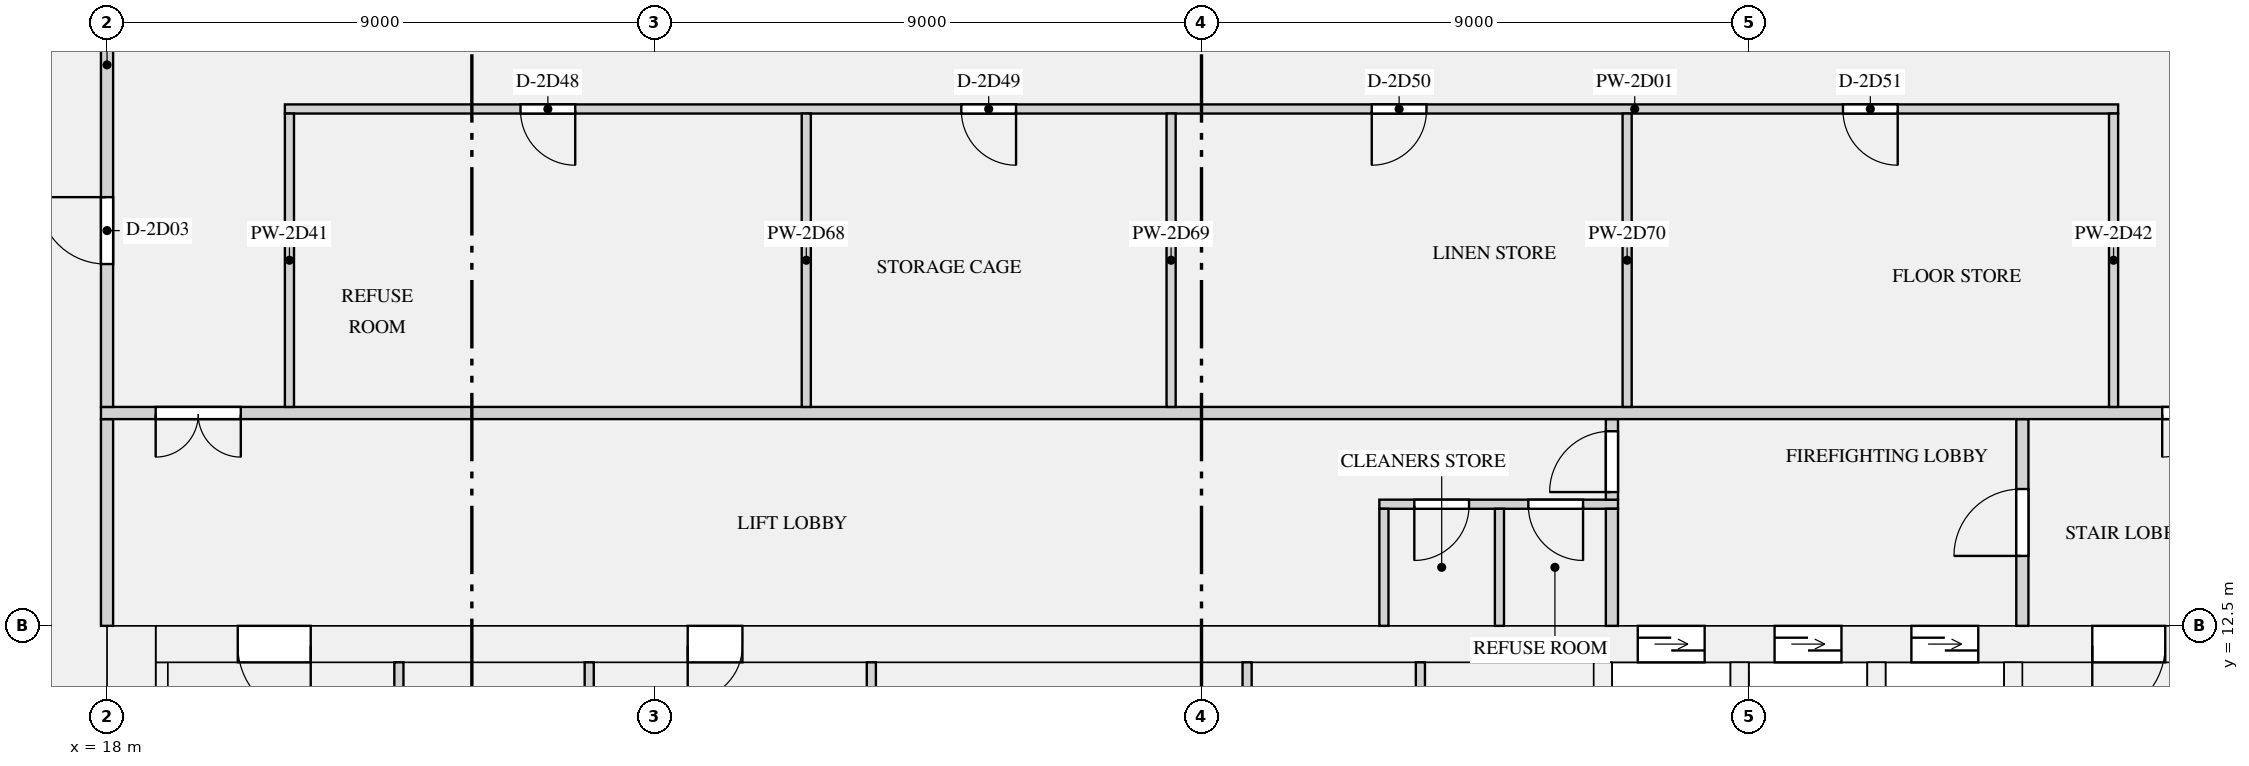
"""IFC4 building model, lengths in metres.
Left out: names, types, materials, properties, quantities, classifications, styles, units other than length and angle.
Written with IfcOpenShell. Run it as: python <this file> out.ifc"""

import sys

from ifc_helpers import new_model, si_unit, direction, frame, frame_2d, origin, place, context, subcontext, project, spatial, rectangle, extrude, element, fill, save


model = new_model("IFC4")
c1 = context("Model", 3, precision=1e-05, world=origin(), true_north=direction((0.0, 1.0)))
c2 = subcontext(c1, "Body", "Model", "MODEL_VIEW")
j1 = project(units=[si_unit("LENGTHUNIT", "METRE"), si_unit("PLANEANGLEUNIT", "RADIAN")], contexts=[c1])
p1 = place(None, origin())
s1 = spatial("IfcSite", under=j1, at=p1, CompositionType="ELEMENT")
p2 = place(p1, origin())
s2 = spatial("IfcBuilding", under=s1, at=p2, CompositionType="ELEMENT")
p3 = place(p2, frame((0.0, 0.0, 111.9)))
s3 = spatial("IfcBuildingStorey", under=s2, at=p3, CompositionType="ELEMENT", Elevation=111.9)
p4 = place(p3, frame((18.4, 0.0, 0.0), z_axis=(0.0, 0.0, 1.0), x_axis=(0.0, 1.0, 0.0)))
e1 = element("IfcWall", 1, at=p4, inside=s3, PredefinedType="SHEAR", context=c2, shape_type="SweptSolid", body=[
    extrude(rectangle(XDim=12.5, YDim=0.8, at=frame_2d((6.25, 0.0))), origin(), (0.0, 0.0, 1.0), 3.15),
])
p5 = place(p3, frame((18.8, 12.2, 0.0), z_axis=(0.0, 0.0, 1.0), x_axis=(1.0, 0.0, 0.0)))
e2 = element("IfcWall", 2, at=p5, inside=s3, PredefinedType="SHEAR", context=c2, shape_type="SweptSolid", body=[
    extrude(rectangle(XDim=34.4, YDim=0.6, at=frame_2d((17.2, 0.0))), origin(), (0.0, 0.0, 1.0), 3.15),
])
p6 = place(p5, frame((24.375, 0.0, 0.0)))
e3 = element("IfcOpeningElement", 3, at=p6, cuts=e2, PredefinedType="OPENING", context=c2, shape_type="SweptSolid", body=[
    extrude(rectangle(XDim=1.1, YDim=2.1, at=frame_2d((0.55, 1.05))), frame((0.0, 0.31, 0.0), z_axis=(0.0, -1.0, 0.0), x_axis=(1.0, 0.0, 0.0)), (0.0, 0.0, 1.0), 0.62),
])
p7 = place(p5, frame((26.625, 0.0, 0.0)))
e4 = element("IfcOpeningElement", 4, at=p7, cuts=e2, PredefinedType="OPENING", context=c2, shape_type="SweptSolid", body=[
    extrude(rectangle(XDim=1.1, YDim=2.1, at=frame_2d((0.55, 1.05))), frame((0.0, 0.31, 0.0), z_axis=(0.0, -1.0, 0.0), x_axis=(1.0, 0.0, 0.0)), (0.0, 0.0, 1.0), 0.62),
])
p8 = place(p5, frame((28.875, 0.0, 0.0)))
e5 = element("IfcOpeningElement", 5, at=p8, cuts=e2, PredefinedType="OPENING", context=c2, shape_type="SweptSolid", body=[
    extrude(rectangle(XDim=1.1, YDim=2.1, at=frame_2d((0.55, 1.05))), frame((0.0, 0.31, 0.0), z_axis=(0.0, -1.0, 0.0), x_axis=(1.0, 0.0, 0.0)), (0.0, 0.0, 1.0), 0.62),
])
p9 = place(p5, frame((8.75, 0.0, 0.0)))
e6 = element("IfcOpeningElement", 6, at=p9, cuts=e2, PredefinedType="OPENING", context=c2, shape_type="SweptSolid", body=[
    extrude(rectangle(XDim=0.9, YDim=2.1, at=frame_2d((0.45, 1.05))), frame((0.0, 0.31, 0.0), z_axis=(0.0, -1.0, 0.0), x_axis=(1.0, 0.0, 0.0)), (0.0, 0.0, 1.0), 0.62),
])
p10 = place(p5, frame((1.35, 0.0, 0.0)))
e7 = element("IfcOpeningElement", 7, at=p10, cuts=e2, PredefinedType="OPENING", context=c2, shape_type="SweptSolid", body=[
    extrude(rectangle(XDim=1.2, YDim=2.1, at=frame_2d((0.6, 1.05))), frame((0.0, 0.31, 0.0), z_axis=(0.0, -1.0, 0.0), x_axis=(1.0, 0.0, 0.0)), (0.0, 0.0, 1.0), 0.62),
])
p11 = place(p5, frame((31.85, 0.0, 0.0)))
e8 = element("IfcOpeningElement", 8, at=p11, cuts=e2, PredefinedType="OPENING", context=c2, shape_type="SweptSolid", body=[
    extrude(rectangle(XDim=1.2, YDim=2.1, at=frame_2d((0.6, 1.05))), frame((0.0, 0.31, 0.0), z_axis=(0.0, -1.0, 0.0), x_axis=(1.0, 0.0, 0.0)), (0.0, 0.0, 1.0), 0.62),
])
p12 = place(p3, frame((18.9, 1.0, 0.0), z_axis=(0.0, 0.0, 1.0), x_axis=(0.0, 1.0, 0.0)))
e9 = element("IfcWall", 9, at=p12, inside=s3, PredefinedType="SHEAR", context=c2, shape_type="SweptSolid", body=[
    extrude(rectangle(XDim=10.9, YDim=0.2, at=frame_2d((5.45, 0.0))), origin(), (0.0, 0.0, 1.0), 3.15),
])
for number, where, z_axis, x_axis in (
    (10, (42.6, 8.25, 0.0), (0.0, 0.0, 1.0), (0.0, 1.0, 0.0)),
    (11, (44.85, 8.25, 0.0), (0.0, 0.0, 1.0), (0.0, 1.0, 0.0)),
    (12, (47.1, 8.25, 0.0), (0.0, 0.0, 1.0), (0.0, 1.0, 0.0)),
    (13, (49.35, 8.25, 0.0), (0.0, 0.0, 1.0), (0.0, 1.0, 0.0)),
):
    element("IfcWall", number, at=place(p3, frame(where, z_axis=z_axis, x_axis=x_axis)), inside=s3, PredefinedType="SHEAR", context=c2, shape_type="SweptSolid", body=[
        extrude(rectangle(XDim=3.65, YDim=0.3, at=frame_2d((1.825, 0.0))), origin(), (0.0, 0.0, 1.0), 3.15),
    ])
p13 = place(p3, frame((38.925, 14.5, 0.0), z_axis=(0.0, 0.0, 1.0), x_axis=(1.0, 0.0, 0.0)))
e14 = element("IfcWall", 14, at=p13, inside=s3, PredefinedType="PARTITIONING", context=c2, shape_type="SweptSolid", body=[
    extrude(rectangle(XDim=3.925, YDim=0.15, at=frame_2d((1.962, 0.0))), origin(), (0.0, 0.0, 1.0), 2.83),
])
p14 = place(p13, frame((0.575, 0.0, 0.0)))
e15 = element("IfcOpeningElement", 15, at=p14, cuts=e14, PredefinedType="OPENING", context=c2, shape_type="SweptSolid", body=[
    extrude(rectangle(XDim=0.9, YDim=2.1, at=frame_2d((0.45, 1.05))), frame((0.0, 0.085, 0.0), z_axis=(0.0, -1.0, 0.0), x_axis=(1.0, 0.0, 0.0)), (0.0, 0.0, 1.0), 0.17),
])
p15 = place(p13, frame((2.45, 0.0, 0.0)))
e16 = element("IfcOpeningElement", 16, at=p15, cuts=e14, PredefinedType="OPENING", context=c2, shape_type="SweptSolid", body=[
    extrude(rectangle(XDim=0.9, YDim=2.1, at=frame_2d((0.45, 1.05))), frame((0.0, 0.085, 0.0), z_axis=(0.0, -1.0, 0.0), x_axis=(1.0, 0.0, 0.0)), (0.0, 0.0, 1.0), 0.17),
])
for number, where, z_axis, x_axis in (
    (17, (22.8, 6.725, 0.0), (0.0, 0.0, 1.0), (0.0, 1.0, 0.0)),
    (18, (36.75, 6.725, 0.0), (0.0, 0.0, 1.0), (0.0, 1.0, 0.0)),
    (19, (39.6, 6.725, 0.0), (0.0, 0.0, 1.0), (0.0, 1.0, 0.0)),
):
    element("IfcWall", number, at=place(p3, frame(where, z_axis=z_axis, x_axis=x_axis)), inside=s3, PredefinedType="PARTITIONING", context=c2, shape_type="SweptSolid", body=[
        extrude(rectangle(XDim=5.175, YDim=0.15, at=frame_2d((2.587, 0.0))), origin(), (0.0, 0.0, 1.0), 2.83),
    ])
for number, where, z_axis, x_axis in (
    (20, (25.93, 9.805, 0.0), (0.0, 0.0, 1.0), (0.0, 1.0, 0.0)),
    (21, (30.57, 9.805, 0.0), (0.0, 0.0, 1.0), (0.0, 1.0, 0.0)),
):
    element("IfcWall", number, at=place(p3, frame(where, z_axis=z_axis, x_axis=x_axis)), inside=s3, PredefinedType="PARTITIONING", context=c2, shape_type="SweptSolid", body=[
        extrude(rectangle(XDim=2.095, YDim=0.15, at=frame_2d((1.047, 0.0))), origin(), (0.0, 0.0, 1.0), 2.83),
    ])
p16 = place(p3, frame((18.0, 12.5, 0.0), z_axis=(0.0, 0.0, 1.0), x_axis=(0.0, 1.0, 0.0)))
e22 = element("IfcWall", 22, at=p16, inside=s3, PredefinedType="PARTITIONING", context=c2, shape_type="SweptSolid", body=[
    extrude(rectangle(XDim=3.4, YDim=0.2, at=frame_2d((1.7, 0.0))), origin(), (0.0, 0.0, 1.0), 2.83),
])
for number, where, z_axis, x_axis in (
    (23, (39.0, 12.5, 0.0), (0.0, 0.0, 1.0), (0.0, 1.0, 0.0)),
    (24, (40.9, 12.5, 0.0), (0.0, 0.0, 1.0), (0.0, 1.0, 0.0)),
):
    element("IfcWall", number, at=place(p3, frame(where, z_axis=z_axis, x_axis=x_axis)), inside=s3, PredefinedType="PARTITIONING", context=c2, shape_type="SweptSolid", body=[
        extrude(rectangle(XDim=1.925, YDim=0.15, at=frame_2d((0.962, 0.0))), origin(), (0.0, 0.0, 1.0), 2.83),
    ])
p17 = place(p3, frame((42.75, 12.5, 0.0), z_axis=(0.0, 0.0, 1.0), x_axis=(0.0, 1.0, 0.0)))
e25 = element("IfcWall", 25, at=p17, inside=s3, PredefinedType="PARTITIONING", context=c2, shape_type="SweptSolid", body=[
    extrude(rectangle(XDim=1.925, YDim=0.2, at=frame_2d((0.962, 0.0))), origin(), (0.0, 0.0, 1.0), 2.83),
])
p18 = place(p3, frame((49.5, 12.5, 0.0), z_axis=(0.0, 0.0, 1.0), x_axis=(0.0, 1.0, 0.0)))
e26 = element("IfcWall", 26, at=p18, inside=s3, PredefinedType="PARTITIONING", context=c2, shape_type="SweptSolid", body=[
    extrude(rectangle(XDim=3.4, YDim=0.2, at=frame_2d((1.7, 0.0))), origin(), (0.0, 0.0, 1.0), 2.83),
])
p19 = place(p18, frame((1.15, 0.0, 0.0)))
e27 = element("IfcOpeningElement", 27, at=p19, cuts=e26, PredefinedType="OPENING", context=c2, shape_type="SweptSolid", body=[
    extrude(rectangle(XDim=1.1, YDim=2.1, at=frame_2d((0.55, 1.05))), frame((0.0, 0.11, 0.0), z_axis=(0.0, -1.0, 0.0), x_axis=(1.0, 0.0, 0.0)), (0.0, 0.0, 1.0), 0.22),
])
p20 = place(p3, frame((42.75, 14.575, 0.0), z_axis=(0.0, 0.0, 1.0), x_axis=(0.0, 1.0, 0.0)))
e28 = element("IfcWall", 28, at=p20, inside=s3, PredefinedType="PARTITIONING", context=c2, shape_type="SweptSolid", body=[
    extrude(rectangle(XDim=1.325, YDim=0.2, at=frame_2d((0.663, 0.0))), origin(), (0.0, 0.0, 1.0), 2.83),
])
p21 = place(p20, frame((0.125, 0.0, 0.0)))
e29 = element("IfcOpeningElement", 29, at=p21, cuts=e28, PredefinedType="OPENING", context=c2, shape_type="SweptSolid", body=[
    extrude(rectangle(XDim=1.0, YDim=2.1, at=frame_2d((0.5, 1.05))), frame((0.0, 0.11, 0.0), z_axis=(0.0, -1.0, 0.0), x_axis=(1.0, 0.0, 0.0)), (0.0, 0.0, 1.0), 0.22),
])
p22 = place(p3, frame((20.925, 21.0, 0.0), z_axis=(0.0, 0.0, 1.0), x_axis=(1.0, 0.0, 0.0)))
e30 = element("IfcWall", 30, at=p22, inside=s3, PredefinedType="PARTITIONING", context=c2, shape_type="SweptSolid", body=[
    extrude(rectangle(XDim=30.15, YDim=0.15, at=frame_2d((15.075, 0.0))), origin(), (0.0, 0.0, 1.0), 2.83),
])
p23 = place(p22, frame((3.875, 0.0, 0.0)))
e31 = element("IfcOpeningElement", 31, at=p23, cuts=e30, PredefinedType="OPENING", context=c2, shape_type="SweptSolid", body=[
    extrude(rectangle(XDim=0.9, YDim=2.1, at=frame_2d((0.45, 1.05))), frame((0.0, 0.085, 0.0), z_axis=(0.0, -1.0, 0.0), x_axis=(1.0, 0.0, 0.0)), (0.0, 0.0, 1.0), 0.17),
])
p24 = place(p22, frame((11.125, 0.0, 0.0)))
e32 = element("IfcOpeningElement", 32, at=p24, cuts=e30, PredefinedType="OPENING", context=c2, shape_type="SweptSolid", body=[
    extrude(rectangle(XDim=0.9, YDim=2.1, at=frame_2d((0.45, 1.05))), frame((0.0, 0.085, 0.0), z_axis=(0.0, -1.0, 0.0), x_axis=(1.0, 0.0, 0.0)), (0.0, 0.0, 1.0), 0.17),
])
p25 = place(p22, frame((17.875, 0.0, 0.0)))
e33 = element("IfcOpeningElement", 33, at=p25, cuts=e30, PredefinedType="OPENING", context=c2, shape_type="SweptSolid", body=[
    extrude(rectangle(XDim=0.9, YDim=2.1, at=frame_2d((0.45, 1.05))), frame((0.0, 0.085, 0.0), z_axis=(0.0, -1.0, 0.0), x_axis=(1.0, 0.0, 0.0)), (0.0, 0.0, 1.0), 0.17),
])
p26 = place(p22, frame((25.625, 0.0, 0.0)))
e34 = element("IfcOpeningElement", 34, at=p26, cuts=e30, PredefinedType="OPENING", context=c2, shape_type="SweptSolid", body=[
    extrude(rectangle(XDim=0.9, YDim=2.1, at=frame_2d((0.45, 1.05))), frame((0.0, 0.085, 0.0), z_axis=(0.0, -1.0, 0.0), x_axis=(1.0, 0.0, 0.0)), (0.0, 0.0, 1.0), 0.17),
])
p27 = place(p3, frame((17.9, 16.0, 0.0), z_axis=(0.0, 0.0, 1.0), x_axis=(1.0, 0.0, 0.0)))
e35 = element("IfcWall", 35, at=p27, inside=s3, PredefinedType="PARTITIONING", context=c2, shape_type="SweptSolid", body=[
    extrude(rectangle(XDim=36.2, YDim=0.2, at=frame_2d((18.1, 0.0))), origin(), (0.0, 0.0, 1.0), 2.83),
])
p28 = place(p27, frame((0.9, 0.0, 0.0)))
e36 = element("IfcOpeningElement", 36, at=p28, cuts=e35, PredefinedType="OPENING", context=c2, shape_type="SweptSolid", body=[
    extrude(rectangle(XDim=1.4, YDim=2.1, at=frame_2d((0.7, 1.05))), frame((0.0, 0.11, 0.0), z_axis=(0.0, -1.0, 0.0), x_axis=(1.0, 0.0, 0.0)), (0.0, 0.0, 1.0), 0.22),
])
p29 = place(p27, frame((33.9, 0.0, 0.0)))
e37 = element("IfcOpeningElement", 37, at=p29, cuts=e35, PredefinedType="OPENING", context=c2, shape_type="SweptSolid", body=[
    extrude(rectangle(XDim=1.4, YDim=2.1, at=frame_2d((0.7, 1.05))), frame((0.0, 0.11, 0.0), z_axis=(0.0, -1.0, 0.0), x_axis=(1.0, 0.0, 0.0)), (0.0, 0.0, 1.0), 0.22),
])
p30 = place(p3, frame((18.0, 16.1, 0.0), z_axis=(0.0, 0.0, 1.0), x_axis=(0.0, 1.0, 0.0)))
e38 = element("IfcWall", 38, at=p30, inside=s3, PredefinedType="PARTITIONING", context=c2, shape_type="SweptSolid", body=[
    extrude(rectangle(XDim=7.8, YDim=0.2, at=frame_2d((3.9, 0.0))), origin(), (0.0, 0.0, 1.0), 2.83),
])
p31 = place(p30, frame((2.35, 0.0, 0.0)))
e39 = element("IfcOpeningElement", 39, at=p31, cuts=e38, PredefinedType="OPENING", context=c2, shape_type="SweptSolid", body=[
    extrude(rectangle(XDim=1.1, YDim=2.1, at=frame_2d((0.55, 1.05))), frame((0.0, 0.11, 0.0), z_axis=(0.0, -1.0, 0.0), x_axis=(1.0, 0.0, 0.0)), (0.0, 0.0, 1.0), 0.22),
])
for number, where, z_axis, x_axis in (
    (40, (21.0, 16.1, 0.0), (0.0, 0.0, 1.0), (0.0, 1.0, 0.0)),
    (41, (51.0, 16.1, 0.0), (0.0, 0.0, 1.0), (0.0, 1.0, 0.0)),
    (42, (29.5, 16.1, 0.0), (0.0, 0.0, 1.0), (0.0, 1.0, 0.0)),
    (43, (35.5, 16.1, 0.0), (0.0, 0.0, 1.0), (0.0, 1.0, 0.0)),
    (44, (43.0, 16.1, 0.0), (0.0, 0.0, 1.0), (0.0, 1.0, 0.0)),
):
    element("IfcWall", number, at=place(p3, frame(where, z_axis=z_axis, x_axis=x_axis)), inside=s3, PredefinedType="PARTITIONING", context=c2, shape_type="SweptSolid", body=[
        extrude(rectangle(XDim=4.825, YDim=0.15, at=frame_2d((2.413, 0.0))), origin(), (0.0, 0.0, 1.0), 2.83),
    ])
p32 = place(p6, origin())
e45 = element("IfcDoor", 45, at=p32, inside=s3, OperationType="DOUBLE_DOOR_SLIDING", PredefinedType="DOOR", context=c2, shape_type="SweptSolid", body=[
    extrude(rectangle(XDim=1.1, YDim=2.1, at=frame_2d((0.55, 1.05))), frame((0.0, 0.025, 0.0), z_axis=(0.0, -1.0, 0.0), x_axis=(1.0, 0.0, 0.0)), (0.0, 0.0, 1.0), 0.05),
])
fill(e3, e45)
p33 = place(p7, origin())
e46 = element("IfcDoor", 46, at=p33, inside=s3, OperationType="DOUBLE_DOOR_SLIDING", PredefinedType="DOOR", context=c2, shape_type="SweptSolid", body=[
    extrude(rectangle(XDim=1.1, YDim=2.1, at=frame_2d((0.55, 1.05))), frame((0.0, 0.025, 0.0), z_axis=(0.0, -1.0, 0.0), x_axis=(1.0, 0.0, 0.0)), (0.0, 0.0, 1.0), 0.05),
])
fill(e4, e46)
p34 = place(p8, origin())
e47 = element("IfcDoor", 47, at=p34, inside=s3, OperationType="DOUBLE_DOOR_SLIDING", PredefinedType="DOOR", context=c2, shape_type="SweptSolid", body=[
    extrude(rectangle(XDim=1.1, YDim=2.1, at=frame_2d((0.55, 1.05))), frame((0.0, 0.025, 0.0), z_axis=(0.0, -1.0, 0.0), x_axis=(1.0, 0.0, 0.0)), (0.0, 0.0, 1.0), 0.05),
])
fill(e5, e47)
p35 = place(p14, frame((0.9, 0.0, 0.0), z_axis=(0.0, 0.0, 1.0), x_axis=(-1.0, 0.0, 0.0)))
e48 = element("IfcDoor", 48, at=p35, inside=s3, OperationType="SINGLE_SWING_RIGHT", PredefinedType="DOOR", context=c2, shape_type="SweptSolid", body=[
    extrude(rectangle(XDim=0.9, YDim=2.1, at=frame_2d((0.45, 1.05))), frame((0.0, 0.025, 0.0), z_axis=(0.0, -1.0, 0.0), x_axis=(1.0, 0.0, 0.0)), (0.0, 0.0, 1.0), 0.05),
])
fill(e15, e48)
p36 = place(p15, frame((0.9, 0.0, 0.0), z_axis=(0.0, 0.0, 1.0), x_axis=(-1.0, 0.0, 0.0)))
e49 = element("IfcDoor", 49, at=p36, inside=s3, OperationType="SINGLE_SWING_LEFT", PredefinedType="DOOR", context=c2, shape_type="SweptSolid", body=[
    extrude(rectangle(XDim=0.9, YDim=2.1, at=frame_2d((0.45, 1.05))), frame((0.0, 0.025, 0.0), z_axis=(0.0, -1.0, 0.0), x_axis=(1.0, 0.0, 0.0)), (0.0, 0.0, 1.0), 0.05),
])
fill(e16, e49)
p37 = place(p9, frame((0.9, 0.0, 0.0), z_axis=(0.0, 0.0, 1.0), x_axis=(-1.0, 0.0, 0.0)))
e50 = element("IfcDoor", 50, at=p37, inside=s3, OperationType="SINGLE_SWING_RIGHT", PredefinedType="DOOR", context=c2, shape_type="SweptSolid", body=[
    extrude(rectangle(XDim=0.9, YDim=2.1, at=frame_2d((0.45, 1.05))), frame((0.0, 0.025, 0.0), z_axis=(0.0, -1.0, 0.0), x_axis=(1.0, 0.0, 0.0)), (0.0, 0.0, 1.0), 0.05),
])
fill(e6, e50)
p38 = place(p10, frame((1.2, 0.0, 0.0), z_axis=(0.0, 0.0, 1.0), x_axis=(-1.0, 0.0, 0.0)))
e51 = element("IfcDoor", 51, at=p38, inside=s3, OperationType="SINGLE_SWING_LEFT", PredefinedType="DOOR", context=c2, shape_type="SweptSolid", body=[
    extrude(rectangle(XDim=1.2, YDim=2.1, at=frame_2d((0.6, 1.05))), frame((0.0, 0.025, 0.0), z_axis=(0.0, -1.0, 0.0), x_axis=(1.0, 0.0, 0.0)), (0.0, 0.0, 1.0), 0.05),
])
fill(e7, e51)
p39 = place(p11, frame((1.2, 0.0, 0.0), z_axis=(0.0, 0.0, 1.0), x_axis=(-1.0, 0.0, 0.0)))
e52 = element("IfcDoor", 52, at=p39, inside=s3, OperationType="SINGLE_SWING_RIGHT", PredefinedType="DOOR", context=c2, shape_type="SweptSolid", body=[
    extrude(rectangle(XDim=1.2, YDim=2.1, at=frame_2d((0.6, 1.05))), frame((0.0, 0.025, 0.0), z_axis=(0.0, -1.0, 0.0), x_axis=(1.0, 0.0, 0.0)), (0.0, 0.0, 1.0), 0.05),
])
fill(e8, e52)
p40 = place(p21, origin())
e53 = element("IfcDoor", 53, at=p40, inside=s3, OperationType="SINGLE_SWING_LEFT", PredefinedType="DOOR", context=c2, shape_type="SweptSolid", body=[
    extrude(rectangle(XDim=1.0, YDim=2.1, at=frame_2d((0.5, 1.05))), frame((0.0, 0.025, 0.0), z_axis=(0.0, -1.0, 0.0), x_axis=(1.0, 0.0, 0.0)), (0.0, 0.0, 1.0), 0.05),
])
fill(e29, e53)
p41 = place(p19, origin())
e54 = element("IfcDoor", 54, at=p41, inside=s3, OperationType="SINGLE_SWING_LEFT", PredefinedType="DOOR", context=c2, shape_type="SweptSolid", body=[
    extrude(rectangle(XDim=1.1, YDim=2.1, at=frame_2d((0.55, 1.05))), frame((0.0, 0.025, 0.0), z_axis=(0.0, -1.0, 0.0), x_axis=(1.0, 0.0, 0.0)), (0.0, 0.0, 1.0), 0.05),
])
fill(e27, e54)
p42 = place(p28, frame((1.4, 0.0, 0.0), z_axis=(0.0, 0.0, 1.0), x_axis=(-1.0, 0.0, 0.0)))
e55 = element("IfcDoor", 55, at=p42, inside=s3, OperationType="DOUBLE_DOOR_SINGLE_SWING", PredefinedType="DOOR", context=c2, shape_type="SweptSolid", body=[
    extrude(rectangle(XDim=1.4, YDim=2.1, at=frame_2d((0.7, 1.05))), frame((0.0, 0.025, 0.0), z_axis=(0.0, -1.0, 0.0), x_axis=(1.0, 0.0, 0.0)), (0.0, 0.0, 1.0), 0.05),
])
fill(e36, e55)
p43 = place(p29, frame((1.4, 0.0, 0.0), z_axis=(0.0, 0.0, 1.0), x_axis=(-1.0, 0.0, 0.0)))
e56 = element("IfcDoor", 56, at=p43, inside=s3, OperationType="DOUBLE_DOOR_SINGLE_SWING", PredefinedType="DOOR", context=c2, shape_type="SweptSolid", body=[
    extrude(rectangle(XDim=1.4, YDim=2.1, at=frame_2d((0.7, 1.05))), frame((0.0, 0.025, 0.0), z_axis=(0.0, -1.0, 0.0), x_axis=(1.0, 0.0, 0.0)), (0.0, 0.0, 1.0), 0.05),
])
fill(e37, e56)
p44 = place(p31, origin())
e57 = element("IfcDoor", 57, at=p44, inside=s3, OperationType="SINGLE_SWING_RIGHT", PredefinedType="DOOR", context=c2, shape_type="SweptSolid", body=[
    extrude(rectangle(XDim=1.1, YDim=2.1, at=frame_2d((0.55, 1.05))), frame((0.0, 0.025, 0.0), z_axis=(0.0, -1.0, 0.0), x_axis=(1.0, 0.0, 0.0)), (0.0, 0.0, 1.0), 0.05),
])
fill(e39, e57)
p45 = place(p23, frame((0.9, 0.0, 0.0), z_axis=(0.0, 0.0, 1.0), x_axis=(-1.0, 0.0, 0.0)))
e58 = element("IfcDoor", 58, at=p45, inside=s3, OperationType="SINGLE_SWING_LEFT", PredefinedType="DOOR", context=c2, shape_type="SweptSolid", body=[
    extrude(rectangle(XDim=0.9, YDim=2.1, at=frame_2d((0.45, 1.05))), frame((0.0, 0.025, 0.0), z_axis=(0.0, -1.0, 0.0), x_axis=(1.0, 0.0, 0.0)), (0.0, 0.0, 1.0), 0.05),
])
fill(e31, e58)
p46 = place(p24, frame((0.9, 0.0, 0.0), z_axis=(0.0, 0.0, 1.0), x_axis=(-1.0, 0.0, 0.0)))
e59 = element("IfcDoor", 59, at=p46, inside=s3, OperationType="SINGLE_SWING_LEFT", PredefinedType="DOOR", context=c2, shape_type="SweptSolid", body=[
    extrude(rectangle(XDim=0.9, YDim=2.1, at=frame_2d((0.45, 1.05))), frame((0.0, 0.025, 0.0), z_axis=(0.0, -1.0, 0.0), x_axis=(1.0, 0.0, 0.0)), (0.0, 0.0, 1.0), 0.05),
])
fill(e32, e59)
p47 = place(p25, frame((0.9, 0.0, 0.0), z_axis=(0.0, 0.0, 1.0), x_axis=(-1.0, 0.0, 0.0)))
e60 = element("IfcDoor", 60, at=p47, inside=s3, OperationType="SINGLE_SWING_RIGHT", PredefinedType="DOOR", context=c2, shape_type="SweptSolid", body=[
    extrude(rectangle(XDim=0.9, YDim=2.1, at=frame_2d((0.45, 1.05))), frame((0.0, 0.025, 0.0), z_axis=(0.0, -1.0, 0.0), x_axis=(1.0, 0.0, 0.0)), (0.0, 0.0, 1.0), 0.05),
])
fill(e33, e60)
p48 = place(p26, frame((0.9, 0.0, 0.0), z_axis=(0.0, 0.0, 1.0), x_axis=(-1.0, 0.0, 0.0)))
e61 = element("IfcDoor", 61, at=p48, inside=s3, OperationType="SINGLE_SWING_LEFT", PredefinedType="DOOR", context=c2, shape_type="SweptSolid", body=[
    extrude(rectangle(XDim=0.9, YDim=2.1, at=frame_2d((0.45, 1.05))), frame((0.0, 0.025, 0.0), z_axis=(0.0, -1.0, 0.0), x_axis=(1.0, 0.0, 0.0)), (0.0, 0.0, 1.0), 0.05),
])
fill(e34, e61)
save(model, sys.argv[1])
